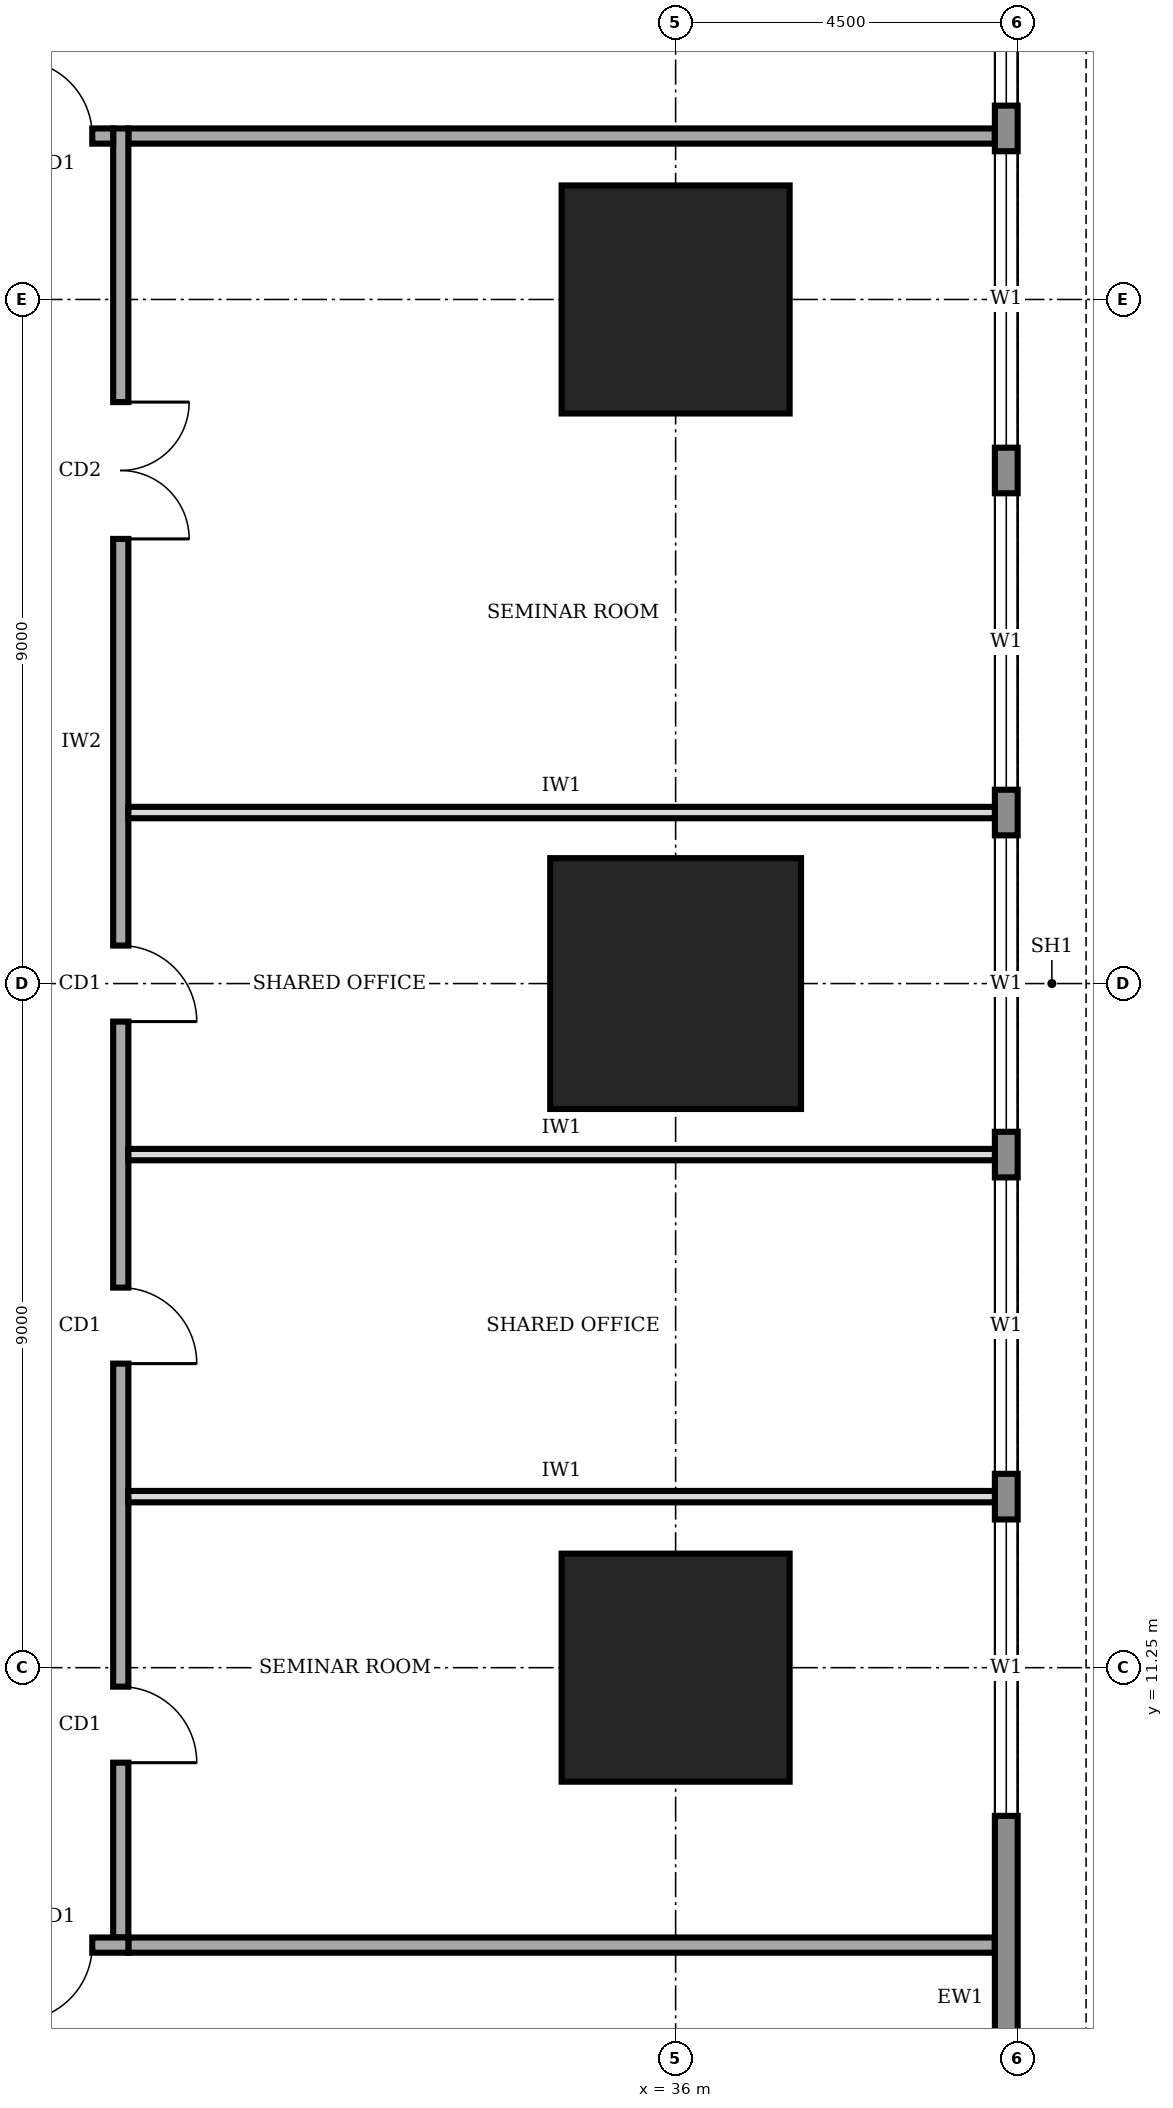
"""IFC4 building model, lengths in metres.
Left out: names, types, materials, properties, quantities, classifications, styles, units other than length and angle.
Written with IfcOpenShell. Run it as: python <this file> out.ifc"""

import sys

from ifc_helpers import new_model, si_unit, direction, frame, frame_2d, origin, origin_2d, place, context, subcontext, project, spatial, rectangle, extrude, element, fill, save


model = new_model("IFC4")
c1 = context("Model", 3, precision=1e-05, world=origin(), true_north=direction((0.0, 1.0)))
c2 = subcontext(c1, "Body", "Model", "MODEL_VIEW")
j1 = project(units=[si_unit("LENGTHUNIT", "METRE"), si_unit("PLANEANGLEUNIT", "RADIAN")], contexts=[c1])
p1 = place(None, origin())
s1 = spatial("IfcSite", under=j1, at=p1, CompositionType="ELEMENT")
p2 = place(p1, origin())
s2 = spatial("IfcBuilding", under=s1, at=p2, CompositionType="ELEMENT")
p3 = place(p2, frame((0.0, 0.0, 25.0)))
s3 = spatial("IfcBuildingStorey", under=s2, at=p3, CompositionType="ELEMENT", Elevation=25.0)
p4 = place(p3, frame((36.0, 11.25, 0.0), z_axis=(0.0, 0.0, 1.0), x_axis=(1.0, 0.0, 0.0)))
e1 = element("IfcColumn", 1, at=p4, inside=s3, PredefinedType="COLUMN", context=c2, shape_type="SweptSolid", body=[
    extrude(rectangle(XDim=3.0, YDim=3.0, at=origin_2d()), origin(), (0.0, 0.0, 1.0), 4.0),
])
p5 = place(p3, frame((36.0, 20.25, 0.0), z_axis=(0.0, 0.0, 1.0), x_axis=(1.0, 0.0, 0.0)))
e2 = element("IfcColumn", 2, at=p5, inside=s3, PredefinedType="COLUMN", context=c2, shape_type="SweptSolid", body=[
    extrude(rectangle(XDim=3.3, YDim=3.3, at=origin_2d()), origin(), (0.0, 0.0, 1.0), 4.0),
])
p6 = place(p3, frame((36.0, 29.25, 0.0), z_axis=(0.0, 0.0, 1.0), x_axis=(1.0, 0.0, 0.0)))
e3 = element("IfcColumn", 3, at=p6, inside=s3, PredefinedType="COLUMN", context=c2, shape_type="SweptSolid", body=[
    extrude(rectangle(XDim=3.0, YDim=3.0, at=origin_2d()), origin(), (0.0, 0.0, 1.0), 4.0),
])
p7 = place(p3, frame((40.35, 4.52, 0.0), z_axis=(0.0, 0.0, 1.0), x_axis=(0.0, 1.0, 0.0)))
e4 = element("IfcWall", 4, at=p7, inside=s3, PredefinedType="STANDARD", context=c2, shape_type="SweptSolid", body=[
    extrude(rectangle(XDim=31.46, YDim=0.3, at=frame_2d((15.73, 0.0))), origin(), (0.0, 0.0, 1.0), 3.75),
])
p8 = place(p7, frame((4.78, 0.0, 0.9)))
e5 = element("IfcOpeningElement", 5, at=p8, cuts=e4, PredefinedType="OPENING", context=c2, shape_type="SweptSolid", body=[
    extrude(rectangle(XDim=3.9, YDim=2.2, at=frame_2d((1.95, 1.1))), frame((0.0, 0.16, 0.0), z_axis=(0.0, -1.0, 0.0), x_axis=(1.0, 0.0, 0.0)), (0.0, 0.0, 1.0), 0.32),
])
p9 = place(p7, frame((9.28, 0.0, 0.9)))
e6 = element("IfcOpeningElement", 6, at=p9, cuts=e4, PredefinedType="OPENING", context=c2, shape_type="SweptSolid", body=[
    extrude(rectangle(XDim=3.9, YDim=2.2, at=frame_2d((1.95, 1.1))), frame((0.0, 0.16, 0.0), z_axis=(0.0, -1.0, 0.0), x_axis=(1.0, 0.0, 0.0)), (0.0, 0.0, 1.0), 0.32),
])
p10 = place(p7, frame((13.78, 0.0, 0.9)))
e7 = element("IfcOpeningElement", 7, at=p10, cuts=e4, PredefinedType="OPENING", context=c2, shape_type="SweptSolid", body=[
    extrude(rectangle(XDim=3.9, YDim=2.2, at=frame_2d((1.95, 1.1))), frame((0.0, 0.16, 0.0), z_axis=(0.0, -1.0, 0.0), x_axis=(1.0, 0.0, 0.0)), (0.0, 0.0, 1.0), 0.32),
])
p11 = place(p7, frame((18.28, 0.0, 0.9)))
e8 = element("IfcOpeningElement", 8, at=p11, cuts=e4, PredefinedType="OPENING", context=c2, shape_type="SweptSolid", body=[
    extrude(rectangle(XDim=3.9, YDim=2.2, at=frame_2d((1.95, 1.1))), frame((0.0, 0.16, 0.0), z_axis=(0.0, -1.0, 0.0), x_axis=(1.0, 0.0, 0.0)), (0.0, 0.0, 1.0), 0.32),
])
p12 = place(p7, frame((22.78, 0.0, 0.9)))
e9 = element("IfcOpeningElement", 9, at=p12, cuts=e4, PredefinedType="OPENING", context=c2, shape_type="SweptSolid", body=[
    extrude(rectangle(XDim=3.9, YDim=2.2, at=frame_2d((1.95, 1.1))), frame((0.0, 0.16, 0.0), z_axis=(0.0, -1.0, 0.0), x_axis=(1.0, 0.0, 0.0)), (0.0, 0.0, 1.0), 0.32),
])
p13 = place(p7, frame((27.28, 0.0, 0.9)))
e10 = element("IfcOpeningElement", 10, at=p13, cuts=e4, PredefinedType="OPENING", context=c2, shape_type="SweptSolid", body=[
    extrude(rectangle(XDim=3.9, YDim=2.2, at=frame_2d((1.95, 1.1))), frame((0.0, 0.16, 0.0), z_axis=(0.0, -1.0, 0.0), x_axis=(1.0, 0.0, 0.0)), (0.0, 0.0, 1.0), 0.32),
])
p14 = place(p3, frame((11.9, 7.6, 0.0), z_axis=(0.0, 0.0, 1.0), x_axis=(1.0, 0.0, 0.0)))
e11 = element("IfcWall", 11, at=p14, inside=s3, PredefinedType="SOLIDWALL", context=c2, shape_type="SweptSolid", body=[
    extrude(rectangle(XDim=16.9, YDim=0.2, at=frame_2d((8.45, 0.0))), origin(), (0.0, 0.0, 1.0), 3.75),
])
p15 = place(p14, frame((0.275, 0.0, 0.0)))
e12 = element("IfcOpeningElement", 12, at=p15, cuts=e11, PredefinedType="OPENING", context=c2, shape_type="SweptSolid", body=[
    extrude(rectangle(XDim=1.0, YDim=2.1, at=frame_2d((0.5, 1.05))), frame((0.0, 0.11, 0.0), z_axis=(0.0, -1.0, 0.0), x_axis=(1.0, 0.0, 0.0)), (0.0, 0.0, 1.0), 0.22),
])
p16 = place(p14, frame((5.6, 0.0, 0.0)))
e13 = element("IfcOpeningElement", 13, at=p16, cuts=e11, PredefinedType="OPENING", context=c2, shape_type="SweptSolid", body=[
    extrude(rectangle(XDim=1.0, YDim=2.1, at=frame_2d((0.5, 1.05))), frame((0.0, 0.11, 0.0), z_axis=(0.0, -1.0, 0.0), x_axis=(1.0, 0.0, 0.0)), (0.0, 0.0, 1.0), 0.22),
])
p17 = place(p14, frame((12.35, 0.0, 0.0)))
e14 = element("IfcOpeningElement", 14, at=p17, cuts=e11, PredefinedType="OPENING", context=c2, shape_type="SweptSolid", body=[
    extrude(rectangle(XDim=1.0, YDim=2.1, at=frame_2d((0.5, 1.05))), frame((0.0, 0.11, 0.0), z_axis=(0.0, -1.0, 0.0), x_axis=(1.0, 0.0, 0.0)), (0.0, 0.0, 1.0), 0.22),
])
p18 = place(p14, frame((15.425, 0.0, 0.0)))
e15 = element("IfcOpeningElement", 15, at=p18, cuts=e11, PredefinedType="OPENING", context=c2, shape_type="SweptSolid", body=[
    extrude(rectangle(XDim=1.0, YDim=2.1, at=frame_2d((0.5, 1.05))), frame((0.0, 0.11, 0.0), z_axis=(0.0, -1.0, 0.0), x_axis=(1.0, 0.0, 0.0)), (0.0, 0.0, 1.0), 0.22),
])
p19 = place(p3, frame((28.7, 7.7, 0.0), z_axis=(0.0, 0.0, 1.0), x_axis=(0.0, 1.0, 0.0)))
e16 = element("IfcWall", 16, at=p19, inside=s3, PredefinedType="SOLIDWALL", context=c2, shape_type="SweptSolid", body=[
    extrude(rectangle(XDim=23.8, YDim=0.2, at=frame_2d((11.9, 0.0))), origin(), (0.0, 0.0, 1.0), 3.75),
])
p20 = place(p19, frame((2.3, 0.0, 0.0)))
e17 = element("IfcOpeningElement", 17, at=p20, cuts=e16, PredefinedType="OPENING", context=c2, shape_type="SweptSolid", body=[
    extrude(rectangle(XDim=1.0, YDim=2.1, at=frame_2d((0.5, 1.05))), frame((0.0, 0.11, 0.0), z_axis=(0.0, -1.0, 0.0), x_axis=(1.0, 0.0, 0.0)), (0.0, 0.0, 1.0), 0.22),
])
p21 = place(p19, frame((7.55, 0.0, 0.0)))
e18 = element("IfcOpeningElement", 18, at=p21, cuts=e16, PredefinedType="OPENING", context=c2, shape_type="SweptSolid", body=[
    extrude(rectangle(XDim=1.0, YDim=2.1, at=frame_2d((0.5, 1.05))), frame((0.0, 0.11, 0.0), z_axis=(0.0, -1.0, 0.0), x_axis=(1.0, 0.0, 0.0)), (0.0, 0.0, 1.0), 0.22),
])
p22 = place(p19, frame((12.05, 0.0, 0.0)))
e19 = element("IfcOpeningElement", 19, at=p22, cuts=e16, PredefinedType="OPENING", context=c2, shape_type="SweptSolid", body=[
    extrude(rectangle(XDim=1.0, YDim=2.1, at=frame_2d((0.5, 1.05))), frame((0.0, 0.11, 0.0), z_axis=(0.0, -1.0, 0.0), x_axis=(1.0, 0.0, 0.0)), (0.0, 0.0, 1.0), 0.22),
])
p23 = place(p19, frame((18.4, 0.0, 0.0)))
e20 = element("IfcOpeningElement", 20, at=p23, cuts=e16, PredefinedType="OPENING", context=c2, shape_type="SweptSolid", body=[
    extrude(rectangle(XDim=1.8, YDim=2.1, at=frame_2d((0.9, 1.05))), frame((0.0, 0.11, 0.0), z_axis=(0.0, -1.0, 0.0), x_axis=(1.0, 0.0, 0.0)), (0.0, 0.0, 1.0), 0.22),
])
p24 = place(p3, frame((28.6, 31.4, 0.0), z_axis=(0.0, 0.0, 1.0), x_axis=(-1.0, 0.0, 0.0)))
e21 = element("IfcWall", 21, at=p24, inside=s3, PredefinedType="SOLIDWALL", context=c2, shape_type="SweptSolid", body=[
    extrude(rectangle(XDim=16.9, YDim=0.2, at=frame_2d((8.45, 0.0))), origin(), (0.0, 0.0, 1.0), 3.75),
])
p25 = place(p24, frame((15.425, 0.0, 0.0)))
e22 = element("IfcOpeningElement", 22, at=p25, cuts=e21, PredefinedType="OPENING", context=c2, shape_type="SweptSolid", body=[
    extrude(rectangle(XDim=1.0, YDim=2.1, at=frame_2d((0.5, 1.05))), frame((0.0, 0.11, 0.0), z_axis=(0.0, -1.0, 0.0), x_axis=(1.0, 0.0, 0.0)), (0.0, 0.0, 1.0), 0.22),
])
p26 = place(p24, frame((12.35, 0.0, 0.0)))
e23 = element("IfcOpeningElement", 23, at=p26, cuts=e21, PredefinedType="OPENING", context=c2, shape_type="SweptSolid", body=[
    extrude(rectangle(XDim=1.0, YDim=2.1, at=frame_2d((0.5, 1.05))), frame((0.0, 0.11, 0.0), z_axis=(0.0, -1.0, 0.0), x_axis=(1.0, 0.0, 0.0)), (0.0, 0.0, 1.0), 0.22),
])
p27 = place(p24, frame((5.6, 0.0, 0.0)))
e24 = element("IfcOpeningElement", 24, at=p27, cuts=e21, PredefinedType="OPENING", context=c2, shape_type="SweptSolid", body=[
    extrude(rectangle(XDim=1.0, YDim=2.1, at=frame_2d((0.5, 1.05))), frame((0.0, 0.11, 0.0), z_axis=(0.0, -1.0, 0.0), x_axis=(1.0, 0.0, 0.0)), (0.0, 0.0, 1.0), 0.22),
])
p28 = place(p24, frame((0.275, 0.0, 0.0)))
e25 = element("IfcOpeningElement", 25, at=p28, cuts=e21, PredefinedType="OPENING", context=c2, shape_type="SweptSolid", body=[
    extrude(rectangle(XDim=1.0, YDim=2.1, at=frame_2d((0.5, 1.05))), frame((0.0, 0.11, 0.0), z_axis=(0.0, -1.0, 0.0), x_axis=(1.0, 0.0, 0.0)), (0.0, 0.0, 1.0), 0.22),
])
for number, where, z_axis, x_axis in (
    (26, (28.8, 7.6, 0.0), (0.0, 0.0, 1.0), (1.0, 0.0, 0.0)),
    (27, (28.8, 31.4, 0.0), (0.0, 0.0, 1.0), (1.0, 0.0, 0.0)),
):
    element("IfcWall", number, at=place(p3, frame(where, z_axis=z_axis, x_axis=x_axis)), inside=s3, PredefinedType="SOLIDWALL", context=c2, shape_type="SweptSolid", body=[
        extrude(rectangle(XDim=11.4, YDim=0.2, at=frame_2d((5.7, 0.0))), origin(), (0.0, 0.0, 1.0), 3.75),
    ])
for number, where, z_axis, x_axis in (
    (28, (28.8, 13.5, 0.0), (0.0, 0.0, 1.0), (1.0, 0.0, 0.0)),
    (29, (28.8, 18.0, 0.0), (0.0, 0.0, 1.0), (1.0, 0.0, 0.0)),
    (30, (28.8, 22.5, 0.0), (0.0, 0.0, 1.0), (1.0, 0.0, 0.0)),
):
    element("IfcWall", number, at=place(p3, frame(where, z_axis=z_axis, x_axis=x_axis)), inside=s3, PredefinedType="PARTITIONING", context=c2, shape_type="SweptSolid", body=[
        extrude(rectangle(XDim=11.4, YDim=0.15, at=frame_2d((5.7, 0.0))), origin(), (0.0, 0.0, 1.0), 3.75),
    ])
p29 = place(p8, origin())
e31 = element("IfcWindow", 31, at=p29, inside=s3, PartitioningType="SINGLE_PANEL", PredefinedType="WINDOW", context=c2, shape_type="SweptSolid", body=[
    extrude(rectangle(XDim=3.9, YDim=2.2, at=frame_2d((1.95, 1.1))), frame((0.0, 0.03, 0.0), z_axis=(0.0, -1.0, 0.0), x_axis=(1.0, 0.0, 0.0)), (0.0, 0.0, 1.0), 0.06),
])
fill(e5, e31)
p30 = place(p9, origin())
e32 = element("IfcWindow", 32, at=p30, inside=s3, PartitioningType="SINGLE_PANEL", PredefinedType="WINDOW", context=c2, shape_type="SweptSolid", body=[
    extrude(rectangle(XDim=3.9, YDim=2.2, at=frame_2d((1.95, 1.1))), frame((0.0, 0.03, 0.0), z_axis=(0.0, -1.0, 0.0), x_axis=(1.0, 0.0, 0.0)), (0.0, 0.0, 1.0), 0.06),
])
fill(e6, e32)
p31 = place(p10, origin())
e33 = element("IfcWindow", 33, at=p31, inside=s3, PartitioningType="SINGLE_PANEL", PredefinedType="WINDOW", context=c2, shape_type="SweptSolid", body=[
    extrude(rectangle(XDim=3.9, YDim=2.2, at=frame_2d((1.95, 1.1))), frame((0.0, 0.03, 0.0), z_axis=(0.0, -1.0, 0.0), x_axis=(1.0, 0.0, 0.0)), (0.0, 0.0, 1.0), 0.06),
])
fill(e7, e33)
p32 = place(p11, origin())
e34 = element("IfcWindow", 34, at=p32, inside=s3, PartitioningType="SINGLE_PANEL", PredefinedType="WINDOW", context=c2, shape_type="SweptSolid", body=[
    extrude(rectangle(XDim=3.9, YDim=2.2, at=frame_2d((1.95, 1.1))), frame((0.0, 0.03, 0.0), z_axis=(0.0, -1.0, 0.0), x_axis=(1.0, 0.0, 0.0)), (0.0, 0.0, 1.0), 0.06),
])
fill(e8, e34)
p33 = place(p12, origin())
e35 = element("IfcWindow", 35, at=p33, inside=s3, PartitioningType="SINGLE_PANEL", PredefinedType="WINDOW", context=c2, shape_type="SweptSolid", body=[
    extrude(rectangle(XDim=3.9, YDim=2.2, at=frame_2d((1.95, 1.1))), frame((0.0, 0.03, 0.0), z_axis=(0.0, -1.0, 0.0), x_axis=(1.0, 0.0, 0.0)), (0.0, 0.0, 1.0), 0.06),
])
fill(e9, e35)
p34 = place(p13, origin())
e36 = element("IfcWindow", 36, at=p34, inside=s3, PartitioningType="SINGLE_PANEL", PredefinedType="WINDOW", context=c2, shape_type="SweptSolid", body=[
    extrude(rectangle(XDim=3.9, YDim=2.2, at=frame_2d((1.95, 1.1))), frame((0.0, 0.03, 0.0), z_axis=(0.0, -1.0, 0.0), x_axis=(1.0, 0.0, 0.0)), (0.0, 0.0, 1.0), 0.06),
])
fill(e10, e36)
p35 = place(p18, frame((1.0, 0.0, 0.0), z_axis=(0.0, 0.0, 1.0), x_axis=(-1.0, 0.0, 0.0)))
e37 = element("IfcDoor", 37, at=p35, inside=s3, OperationType="SINGLE_SWING_RIGHT", PredefinedType="DOOR", context=c2, shape_type="SweptSolid", body=[
    extrude(rectangle(XDim=1.0, YDim=2.1, at=frame_2d((0.5, 1.05))), frame((0.0, 0.025, 0.0), z_axis=(0.0, -1.0, 0.0), x_axis=(1.0, 0.0, 0.0)), (0.0, 0.0, 1.0), 0.05),
])
fill(e15, e37)
p36 = place(p20, frame((1.0, 0.0, 0.0), z_axis=(0.0, 0.0, 1.0), x_axis=(-1.0, 0.0, 0.0)))
e38 = element("IfcDoor", 38, at=p36, inside=s3, OperationType="SINGLE_SWING_RIGHT", PredefinedType="DOOR", context=c2, shape_type="SweptSolid", body=[
    extrude(rectangle(XDim=1.0, YDim=2.1, at=frame_2d((0.5, 1.05))), frame((0.0, 0.025, 0.0), z_axis=(0.0, -1.0, 0.0), x_axis=(1.0, 0.0, 0.0)), (0.0, 0.0, 1.0), 0.05),
])
fill(e17, e38)
p37 = place(p21, frame((1.0, 0.0, 0.0), z_axis=(0.0, 0.0, 1.0), x_axis=(-1.0, 0.0, 0.0)))
e39 = element("IfcDoor", 39, at=p37, inside=s3, OperationType="SINGLE_SWING_RIGHT", PredefinedType="DOOR", context=c2, shape_type="SweptSolid", body=[
    extrude(rectangle(XDim=1.0, YDim=2.1, at=frame_2d((0.5, 1.05))), frame((0.0, 0.025, 0.0), z_axis=(0.0, -1.0, 0.0), x_axis=(1.0, 0.0, 0.0)), (0.0, 0.0, 1.0), 0.05),
])
fill(e18, e39)
p38 = place(p22, frame((1.0, 0.0, 0.0), z_axis=(0.0, 0.0, 1.0), x_axis=(-1.0, 0.0, 0.0)))
e40 = element("IfcDoor", 40, at=p38, inside=s3, OperationType="SINGLE_SWING_RIGHT", PredefinedType="DOOR", context=c2, shape_type="SweptSolid", body=[
    extrude(rectangle(XDim=1.0, YDim=2.1, at=frame_2d((0.5, 1.05))), frame((0.0, 0.025, 0.0), z_axis=(0.0, -1.0, 0.0), x_axis=(1.0, 0.0, 0.0)), (0.0, 0.0, 1.0), 0.05),
])
fill(e19, e40)
p39 = place(p23, frame((1.8, 0.0, 0.0), z_axis=(0.0, 0.0, 1.0), x_axis=(-1.0, 0.0, 0.0)))
e41 = element("IfcDoor", 41, at=p39, inside=s3, OperationType="DOUBLE_DOOR_SINGLE_SWING", PredefinedType="DOOR", context=c2, shape_type="SweptSolid", body=[
    extrude(rectangle(XDim=1.8, YDim=2.1, at=frame_2d((0.9, 1.05))), frame((0.0, 0.025, 0.0), z_axis=(0.0, -1.0, 0.0), x_axis=(1.0, 0.0, 0.0)), (0.0, 0.0, 1.0), 0.05),
])
fill(e20, e41)
p40 = place(p28, frame((1.0, 0.0, 0.0), z_axis=(0.0, 0.0, 1.0), x_axis=(-1.0, 0.0, 0.0)))
e42 = element("IfcDoor", 42, at=p40, inside=s3, OperationType="SINGLE_SWING_LEFT", PredefinedType="DOOR", context=c2, shape_type="SweptSolid", body=[
    extrude(rectangle(XDim=1.0, YDim=2.1, at=frame_2d((0.5, 1.05))), frame((0.0, 0.025, 0.0), z_axis=(0.0, -1.0, 0.0), x_axis=(1.0, 0.0, 0.0)), (0.0, 0.0, 1.0), 0.05),
])
fill(e25, e42)
save(model, sys.argv[1])
